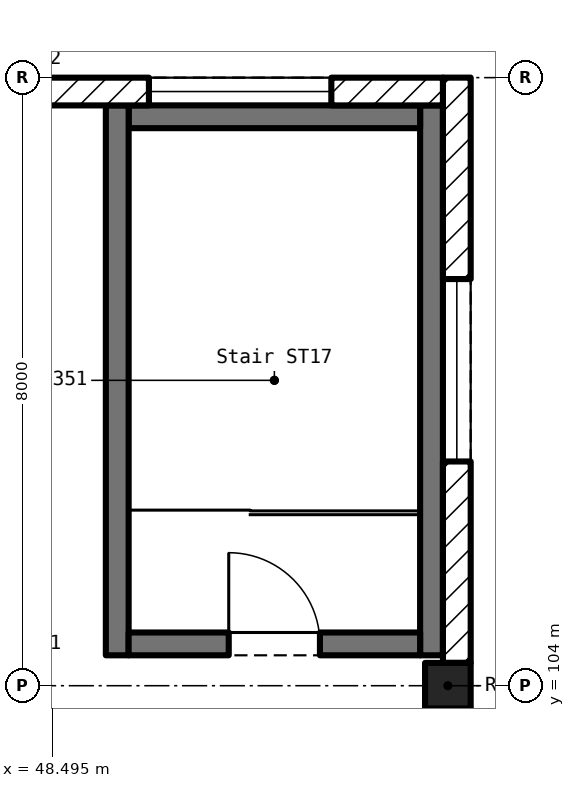
"""IFC4 building model, lengths in metres.
Left out: names, types, materials, properties, quantities, classifications, styles, units other than length and angle.
Written with IfcOpenShell. Run it as: python <this file> out.ifc"""

import sys

from ifc_helpers import new_model, si_unit, direction, frame, frame_2d, origin, origin_2d, place, context, subcontext, project, spatial, rectangle, extrude, element, fill, save


model = new_model("IFC4")
c1 = context("Model", 3, precision=1e-05, world=origin(), true_north=direction((0.0, 1.0)))
c2 = subcontext(c1, "Body", "Model", "MODEL_VIEW")
j1 = project(units=[si_unit("LENGTHUNIT", "METRE"), si_unit("PLANEANGLEUNIT", "RADIAN")], contexts=[c1])
p1 = place(None, origin())
s1 = spatial("IfcSite", under=j1, at=p1, CompositionType="ELEMENT")
p2 = place(p1, origin())
s2 = spatial("IfcBuilding", under=s1, at=p2, CompositionType="ELEMENT")
p3 = place(p2, frame((0.0, 0.0, 22.5)))
s3 = spatial("IfcBuildingStorey", under=s2, at=p3, CompositionType="ELEMENT", Elevation=22.5)
p4 = place(p3, frame((53.7, 104.0, 0.0), z_axis=(0.0, 0.0, 1.0), x_axis=(1.0, 0.0, 0.0)))
e1 = element("IfcColumn", 1, at=p4, inside=s3, PredefinedType="COLUMN", context=c2, shape_type="SweptSolid", body=[
    extrude(rectangle(XDim=0.6, YDim=0.6, at=origin_2d()), origin(), (0.0, 0.0, 1.0), 5.5),
])
p5 = place(p3, frame((53.818, 104.3, 0.0), z_axis=(0.0, 0.0, 1.0), x_axis=(0.0, 1.0, 0.0)))
e2 = element("IfcWall", 2, at=p5, inside=s3, PredefinedType="SOLIDWALL", context=c2, shape_type="SweptSolid", body=[
    extrude(rectangle(XDim=7.7, YDim=0.365, at=frame_2d((3.85, 0.0))), origin(), (0.0, 0.0, 1.0), 4.45),
])
p6 = place(p5, frame((2.65, 0.0, 1.0)))
e3 = element("IfcOpeningElement", 3, at=p6, cuts=e2, PredefinedType="OPENING", context=c2, shape_type="SweptSolid", body=[
    extrude(rectangle(XDim=2.4, YDim=2.0, at=frame_2d((1.2, 1.0))), frame((0.0, 0.195, 0.0), z_axis=(0.0, -1.0, 0.0), x_axis=(1.0, 0.0, 0.0)), (0.0, 0.0, 1.0), 0.389),
])
p7 = place(p3, frame((53.635, 111.817, 0.0), z_axis=(0.0, 0.0, 1.0), x_axis=(-1.0, 0.0, 0.0)))
e4 = element("IfcWall", 4, at=p7, inside=s3, PredefinedType="SOLIDWALL", context=c2, shape_type="SweptSolid", body=[
    extrude(rectangle(XDim=5.335, YDim=0.365, at=frame_2d((2.667, 0.0))), origin(), (0.0, 0.0, 1.0), 4.45),
])
p8 = place(p7, frame((1.468, 0.0, 1.0)))
e5 = element("IfcOpeningElement", 5, at=p8, cuts=e4, PredefinedType="OPENING", context=c2, shape_type="SweptSolid", body=[
    extrude(rectangle(XDim=2.4, YDim=2.0, at=frame_2d((1.2, 1.0))), frame((0.0, 0.195, 0.0), z_axis=(0.0, -1.0, 0.0), x_axis=(1.0, 0.0, 0.0)), (0.0, 0.0, 1.0), 0.389),
])
p9 = place(p3, frame((53.485, 104.4, 0.0), z_axis=(0.0, 0.0, 1.0), x_axis=(0.0, 1.0, 0.0)))
e6 = element("IfcWall", 6, at=p9, inside=s3, PredefinedType="SOLIDWALL", context=c2, shape_type="SweptSolid", body=[
    extrude(rectangle(XDim=7.235, YDim=0.3, at=frame_2d((3.618, 0.0))), origin(), (0.0, 0.0, 1.0), 5.25),
])
p10 = place(p3, frame((53.335, 111.485, 0.0), z_axis=(0.0, 0.0, 1.0), x_axis=(-1.0, 0.0, 0.0)))
e7 = element("IfcWall", 7, at=p10, inside=s3, PredefinedType="SOLIDWALL", context=c2, shape_type="SweptSolid", body=[
    extrude(rectangle(XDim=3.835, YDim=0.3, at=frame_2d((1.917, 0.0))), origin(), (0.0, 0.0, 1.0), 5.25),
])
p11 = place(p3, frame((49.35, 111.635, 0.0), z_axis=(0.0, 0.0, 1.0), x_axis=(0.0, -1.0, 0.0)))
e8 = element("IfcWall", 8, at=p11, inside=s3, PredefinedType="SOLIDWALL", context=c2, shape_type="SweptSolid", body=[
    extrude(rectangle(XDim=7.235, YDim=0.3, at=frame_2d((3.618, 0.0))), origin(), (0.0, 0.0, 1.0), 5.25),
])
p12 = place(p3, frame((49.5, 104.55, 0.0), z_axis=(0.0, 0.0, 1.0), x_axis=(1.0, 0.0, 0.0)))
e9 = element("IfcWall", 9, at=p12, inside=s3, PredefinedType="SOLIDWALL", context=c2, shape_type="SweptSolid", body=[
    extrude(rectangle(XDim=3.835, YDim=0.3, at=frame_2d((1.917, 0.0))), origin(), (0.0, 0.0, 1.0), 5.25),
])
p13 = place(p12, frame((1.317, 0.0, 0.0)))
e10 = element("IfcOpeningElement", 10, at=p13, cuts=e9, PredefinedType="OPENING", context=c2, shape_type="SweptSolid", body=[
    extrude(rectangle(XDim=1.2, YDim=2.1, at=frame_2d((0.6, 1.05))), frame((0.0, 0.162, 0.0), z_axis=(0.0, -1.0, 0.0), x_axis=(1.0, 0.0, 0.0)), (0.0, 0.0, 1.0), 0.324),
])
p14 = place(p6, origin())
e11 = element("IfcWindow", 11, at=p14, inside=s3, PartitioningType="DOUBLE_PANEL_VERTICAL", PredefinedType="WINDOW", context=c2, shape_type="SweptSolid", body=[
    extrude(rectangle(XDim=2.4, YDim=2.0, at=frame_2d((1.2, 1.0))), frame((0.0, 0.03, 0.0), z_axis=(0.0, -1.0, 0.0), x_axis=(1.0, 0.0, 0.0)), (0.0, 0.0, 1.0), 0.06),
])
fill(e3, e11)
p15 = place(p8, origin())
e12 = element("IfcWindow", 12, at=p15, inside=s3, PartitioningType="DOUBLE_PANEL_VERTICAL", PredefinedType="WINDOW", context=c2, shape_type="SweptSolid", body=[
    extrude(rectangle(XDim=2.4, YDim=2.0, at=frame_2d((1.2, 1.0))), frame((0.0, 0.03, 0.0), z_axis=(0.0, -1.0, 0.0), x_axis=(1.0, 0.0, 0.0)), (0.0, 0.0, 1.0), 0.06),
])
fill(e5, e12)
p16 = place(p13, origin())
e13 = element("IfcDoor", 13, at=p16, inside=s3, OperationType="SINGLE_SWING_LEFT", PredefinedType="DOOR", context=c2, shape_type="SweptSolid", body=[
    extrude(rectangle(XDim=1.2, YDim=2.1, at=frame_2d((0.6, 1.05))), frame((0.0, 0.025, 0.0), z_axis=(0.0, -1.0, 0.0), x_axis=(1.0, 0.0, 0.0)), (0.0, 0.0, 1.0), 0.05),
])
fill(e10, e13)
save(model, sys.argv[1])
